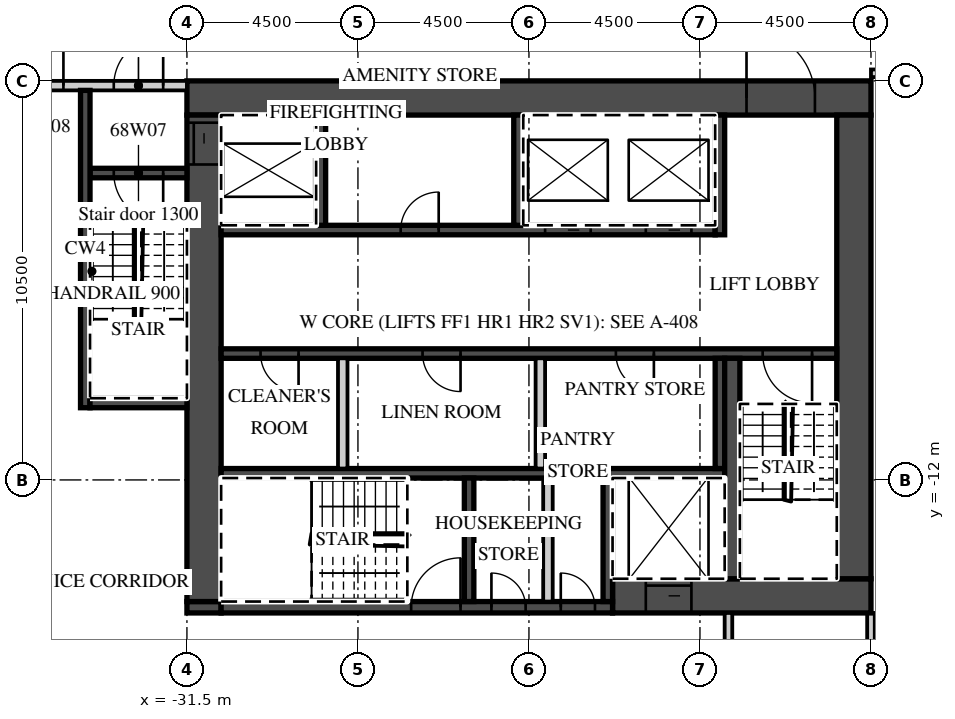
"""IFC4 building model, lengths in metres.
Left out: names, types, materials, properties, quantities, classifications, styles, units other than length and angle.
Written with IfcOpenShell. Run it as: python <this file> out.ifc"""

import sys

from ifc_helpers import new_model, si_unit, direction, frame, frame_2d, origin, place, context, subcontext, project, spatial, rectangle, extrude, element, fill, save


model = new_model("IFC4")
c1 = context("Model", 3, precision=1e-05, world=origin(), true_north=direction((0.0, 1.0)))
c2 = subcontext(c1, "Body", "Model", "MODEL_VIEW")
j1 = project(units=[si_unit("LENGTHUNIT", "METRE"), si_unit("PLANEANGLEUNIT", "RADIAN")], contexts=[c1])
p1 = place(None, origin())
s1 = spatial("IfcSite", under=j1, at=p1, CompositionType="ELEMENT")
p2 = place(p1, origin())
s2 = spatial("IfcBuilding", under=s1, at=p2, CompositionType="ELEMENT")
p3 = place(p2, frame((0.0, 0.0, 275.1)))
s3 = spatial("IfcBuildingStorey", under=s2, at=p3, CompositionType="ELEMENT", Elevation=275.1)
p4 = place(p3, frame((-13.5, -21.396, 0.0), z_axis=(0.0, 0.0, 1.0), x_axis=(0.0, 1.0, 0.0)))
e1 = element("IfcWall", 1, at=p4, inside=s3, PredefinedType="PARTITIONING", context=c2, shape_type="SweptSolid", body=[
    extrude(rectangle(XDim=5.896, YDim=0.2, at=frame_2d((2.948, 0.0))), origin(), (0.0, 0.0, 1.0), 3.02),
])
p5 = place(p3, frame((-13.5, -1.3, 0.0), z_axis=(0.0, 0.0, 1.0), x_axis=(1.0, 0.0, 0.0)))
e2 = element("IfcWall", 2, at=p5, inside=s3, PredefinedType="PARTITIONING", context=c2, shape_type="SweptSolid", body=[
    extrude(rectangle(XDim=50.293, YDim=0.2, at=frame_2d((25.146, 0.0))), origin(), (0.0, 0.0, 1.0), 3.02),
])
p6 = place(p5, frame((0.575, 0.0, 0.0)))
e3 = element("IfcOpeningElement", 3, at=p6, cuts=e2, PredefinedType="OPENING", context=c2, shape_type="SweptSolid", body=[
    extrude(rectangle(XDim=1.0, YDim=2.1, at=frame_2d((0.5, 1.05))), frame((0.0, 0.11, 0.0), z_axis=(0.0, -1.0, 0.0), x_axis=(1.0, 0.0, 0.0)), (0.0, 0.0, 1.0), 0.22),
])
p7 = place(p5, frame((6.938, 0.0, 0.0)))
e4 = element("IfcOpeningElement", 4, at=p7, cuts=e2, PredefinedType="OPENING", context=c2, shape_type="SweptSolid", body=[
    extrude(rectangle(XDim=1.2, YDim=2.1, at=frame_2d((0.6, 1.05))), frame((0.0, 0.11, 0.0), z_axis=(0.0, -1.0, 0.0), x_axis=(1.0, 0.0, 0.0)), (0.0, 0.0, 1.0), 0.22),
])
p8 = place(p5, frame((18.862, 0.0, 0.0)))
e5 = element("IfcOpeningElement", 5, at=p8, cuts=e2, PredefinedType="OPENING", context=c2, shape_type="SweptSolid", body=[
    extrude(rectangle(XDim=1.2, YDim=2.1, at=frame_2d((0.6, 1.05))), frame((0.0, 0.11, 0.0), z_axis=(0.0, -1.0, 0.0), x_axis=(1.0, 0.0, 0.0)), (0.0, 0.0, 1.0), 0.22),
])
p9 = place(p5, frame((24.938, 0.0, 0.0)))
e6 = element("IfcOpeningElement", 6, at=p9, cuts=e2, PredefinedType="OPENING", context=c2, shape_type="SweptSolid", body=[
    extrude(rectangle(XDim=1.2, YDim=2.1, at=frame_2d((0.6, 1.05))), frame((0.0, 0.11, 0.0), z_axis=(0.0, -1.0, 0.0), x_axis=(1.0, 0.0, 0.0)), (0.0, 0.0, 1.0), 0.22),
])
p10 = place(p5, frame((36.862, 0.0, 0.0)))
e7 = element("IfcOpeningElement", 7, at=p10, cuts=e2, PredefinedType="OPENING", context=c2, shape_type="SweptSolid", body=[
    extrude(rectangle(XDim=1.2, YDim=2.1, at=frame_2d((0.6, 1.05))), frame((0.0, 0.11, 0.0), z_axis=(0.0, -1.0, 0.0), x_axis=(1.0, 0.0, 0.0)), (0.0, 0.0, 1.0), 0.22),
])
p11 = place(p5, frame((43.45, 0.0, 0.0)))
e8 = element("IfcOpeningElement", 8, at=p11, cuts=e2, PredefinedType="OPENING", context=c2, shape_type="SweptSolid", body=[
    extrude(rectangle(XDim=1.0, YDim=2.1, at=frame_2d((0.5, 1.05))), frame((0.0, 0.11, 0.0), z_axis=(0.0, -1.0, 0.0), x_axis=(1.0, 0.0, 0.0)), (0.0, 0.0, 1.0), 0.22),
])
p12 = place(p5, frame((45.55, 0.0, 0.0)))
e9 = element("IfcOpeningElement", 9, at=p12, cuts=e2, PredefinedType="OPENING", context=c2, shape_type="SweptSolid", body=[
    extrude(rectangle(XDim=1.0, YDim=2.1, at=frame_2d((0.5, 1.05))), frame((0.0, 0.11, 0.0), z_axis=(0.0, -1.0, 0.0), x_axis=(1.0, 0.0, 0.0)), (0.0, 0.0, 1.0), 0.22),
])
p13 = place(p3, frame((-31.5, -1.95, 0.0), z_axis=(0.0, 0.0, 1.0), x_axis=(1.0, 0.0, 0.0)))
e10 = element("IfcWall", 10, at=p13, inside=s3, PredefinedType="SHEAR", context=c2, shape_type="SweptSolid", body=[
    extrude(rectangle(XDim=18.0, YDim=0.9, at=frame_2d((9.0, 0.0))), origin(), (0.0, 0.0, 1.0), 3.02),
])
p14 = place(p13, frame((14.725, 0.0, 0.0)))
e11 = element("IfcOpeningElement", 11, at=p14, cuts=e10, PredefinedType="OPENING", context=c2, shape_type="SweptSolid", body=[
    extrude(rectangle(XDim=1.8, YDim=2.1, at=frame_2d((0.9, 1.05))), frame((0.0, 0.46, 0.0), z_axis=(0.0, -1.0, 0.0), x_axis=(1.0, 0.0, 0.0)), (0.0, 0.0, 1.0), 0.92),
])
p15 = place(p3, frame((-20.3, -15.05, 0.0), z_axis=(0.0, 0.0, 1.0), x_axis=(1.0, 0.0, 0.0)))
e12 = element("IfcWall", 12, at=p15, inside=s3, PredefinedType="SHEAR", context=c2, shape_type="SweptSolid", body=[
    extrude(rectangle(XDim=6.8, YDim=0.9, at=frame_2d((3.4, 0.0))), origin(), (0.0, 0.0, 1.0), 3.02),
])
p16 = place(p15, frame((0.875, 0.0, 0.0)))
e13 = element("IfcOpeningElement", 13, at=p16, cuts=e12, PredefinedType="OPENING", context=c2, shape_type="SweptSolid", body=[
    extrude(rectangle(XDim=1.2, YDim=2.1, at=frame_2d((0.6, 1.05))), frame((0.0, 0.46, 0.0), z_axis=(0.0, -1.0, 0.0), x_axis=(1.0, 0.0, 0.0)), (0.0, 0.0, 1.0), 0.92),
])
p17 = place(p3, frame((-31.5, -15.35, 0.0), z_axis=(0.0, 0.0, 1.0), x_axis=(1.0, 0.0, 0.0)))
e14 = element("IfcWall", 14, at=p17, inside=s3, PredefinedType="SHEAR", context=c2, shape_type="SweptSolid", body=[
    extrude(rectangle(XDim=0.9, YDim=0.3, at=frame_2d((0.45, 0.0))), origin(), (0.0, 0.0, 1.0), 3.02),
])
p18 = place(p3, frame((-30.6, -15.35, 0.0), z_axis=(0.0, 0.0, 1.0), x_axis=(1.0, 0.0, 0.0)))
e15 = element("IfcWall", 15, at=p18, inside=s3, PredefinedType="SHEAR", context=c2, shape_type="SweptSolid", body=[
    extrude(rectangle(XDim=10.3, YDim=0.3, at=frame_2d((5.15, 0.0))), origin(), (0.0, 0.0, 1.0), 3.02),
])
p19 = place(p18, frame((5.0, 0.0, 0.0)))
e16 = element("IfcOpeningElement", 16, at=p19, cuts=e15, PredefinedType="OPENING", context=c2, shape_type="SweptSolid", body=[
    extrude(rectangle(XDim=1.3, YDim=2.1, at=frame_2d((0.65, 1.05))), frame((0.0, 0.16, 0.0), z_axis=(0.0, -1.0, 0.0), x_axis=(1.0, 0.0, 0.0)), (0.0, 0.0, 1.0), 0.32),
])
p20 = place(p18, frame((7.113, 0.0, 0.0)))
e17 = element("IfcOpeningElement", 17, at=p20, cuts=e15, PredefinedType="OPENING", context=c2, shape_type="SweptSolid", body=[
    extrude(rectangle(XDim=0.9, YDim=2.1, at=frame_2d((0.45, 1.05))), frame((0.0, 0.16, 0.0), z_axis=(0.0, -1.0, 0.0), x_axis=(1.0, 0.0, 0.0)), (0.0, 0.0, 1.0), 0.32),
])
p21 = place(p18, frame((8.938, 0.0, 0.0)))
e18 = element("IfcOpeningElement", 18, at=p21, cuts=e15, PredefinedType="OPENING", context=c2, shape_type="SweptSolid", body=[
    extrude(rectangle(XDim=0.9, YDim=2.1, at=frame_2d((0.45, 1.05))), frame((0.0, 0.16, 0.0), z_axis=(0.0, -1.0, 0.0), x_axis=(1.0, 0.0, 0.0)), (0.0, 0.0, 1.0), 0.32),
])
p22 = place(p3, frame((-31.05, -15.2, 0.0), z_axis=(0.0, 0.0, 1.0), x_axis=(0.0, 1.0, 0.0)))
e19 = element("IfcWall", 19, at=p22, inside=s3, PredefinedType="SHEAR", context=c2, shape_type="SweptSolid", body=[
    extrude(rectangle(XDim=12.8, YDim=0.9, at=frame_2d((6.4, 0.0))), origin(), (0.0, 0.0, 1.0), 3.02),
])
p23 = place(p22, frame((11.5, 0.0, 0.0)))
e20 = element("IfcOpeningElement", 20, at=p23, cuts=e19, PredefinedType="OPENING", context=c2, shape_type="SweptSolid", body=[
    extrude(rectangle(XDim=1.1, YDim=2.1, at=frame_2d((0.55, 1.05))), frame((0.0, 0.46, 0.0), z_axis=(0.0, -1.0, 0.0), x_axis=(1.0, 0.0, 0.0)), (0.0, 0.0, 1.0), 0.92),
])
p24 = place(p3, frame((-13.95, -14.6, 0.0), z_axis=(0.0, 0.0, 1.0), x_axis=(0.0, 1.0, 0.0)))
e21 = element("IfcWall", 21, at=p24, inside=s3, PredefinedType="SHEAR", context=c2, shape_type="SweptSolid", body=[
    extrude(rectangle(XDim=12.2, YDim=0.9, at=frame_2d((6.1, 0.0))), origin(), (0.0, 0.0, 1.0), 3.02),
])
p25 = place(p3, frame((-30.6, -5.425, 0.0), z_axis=(0.0, 0.0, 1.0), x_axis=(1.0, 0.0, 0.0)))
e22 = element("IfcWall", 22, at=p25, inside=s3, PredefinedType="SHEAR", context=c2, shape_type="SweptSolid", body=[
    extrude(rectangle(XDim=13.0, YDim=0.25, at=frame_2d((6.5, 0.0))), origin(), (0.0, 0.0, 1.0), 3.02),
])
p26 = place(p25, frame((8.525, 0.0, 0.0)))
e23 = element("IfcOpeningElement", 23, at=p26, cuts=e22, PredefinedType="OPENING", context=c2, shape_type="SweptSolid", body=[
    extrude(rectangle(XDim=1.2, YDim=2.1, at=frame_2d((0.6, 1.05))), frame((0.0, 0.135, 0.0), z_axis=(0.0, -1.0, 0.0), x_axis=(1.0, 0.0, 0.0)), (0.0, 0.0, 1.0), 0.27),
])
p27 = place(p25, frame((11.175, 0.0, 0.0)))
e24 = element("IfcOpeningElement", 24, at=p27, cuts=e22, PredefinedType="OPENING", context=c2, shape_type="SweptSolid", body=[
    extrude(rectangle(XDim=1.2, YDim=2.1, at=frame_2d((0.6, 1.05))), frame((0.0, 0.135, 0.0), z_axis=(0.0, -1.0, 0.0), x_axis=(1.0, 0.0, 0.0)), (0.0, 0.0, 1.0), 0.27),
])
p28 = place(p25, frame((4.725, 0.0, 0.0)))
e25 = element("IfcOpeningElement", 25, at=p28, cuts=e22, PredefinedType="OPENING", context=c2, shape_type="SweptSolid", body=[
    extrude(rectangle(XDim=1.0, YDim=2.1, at=frame_2d((0.5, 1.05))), frame((0.0, 0.135, 0.0), z_axis=(0.0, -1.0, 0.0), x_axis=(1.0, 0.0, 0.0)), (0.0, 0.0, 1.0), 0.27),
])
p29 = place(p3, frame((-17.475, -5.55, 0.0), z_axis=(0.0, 0.0, 1.0), x_axis=(0.0, 1.0, 0.0)))
e26 = element("IfcWall", 26, at=p29, inside=s3, PredefinedType="SHEAR", context=c2, shape_type="SweptSolid", body=[
    extrude(rectangle(XDim=3.15, YDim=0.25, at=frame_2d((1.575, 0.0))), origin(), (0.0, 0.0, 1.0), 3.02),
])
for number, where, z_axis, x_axis in (
    (27, (-27.975, -5.3, 0.0), (0.0, 0.0, 1.0), (0.0, 1.0, 0.0)),
    (28, (-22.775, -5.3, 0.0), (0.0, 0.0, 1.0), (0.0, 1.0, 0.0)),
):
    element("IfcWall", number, at=place(p3, frame(where, z_axis=z_axis, x_axis=x_axis)), inside=s3, PredefinedType="SHEAR", context=c2, shape_type="SweptSolid", body=[
        extrude(rectangle(XDim=2.9, YDim=0.25, at=frame_2d((1.45, 0.0))), origin(), (0.0, 0.0, 1.0), 3.02),
    ])
p30 = place(p3, frame((-30.6, -8.675, 0.0), z_axis=(0.0, 0.0, 1.0), x_axis=(1.0, 0.0, 0.0)))
e29 = element("IfcWall", 29, at=p30, inside=s3, PredefinedType="SHEAR", context=c2, shape_type="SweptSolid", body=[
    extrude(rectangle(XDim=16.2, YDim=0.25, at=frame_2d((8.1, 0.0))), origin(), (0.0, 0.0, 1.0), 3.02),
])
p31 = place(p30, frame((14.25, 0.0, 0.0)))
e30 = element("IfcOpeningElement", 30, at=p31, cuts=e29, PredefinedType="OPENING", context=c2, shape_type="SweptSolid", body=[
    extrude(rectangle(XDim=1.3, YDim=2.1, at=frame_2d((0.65, 1.05))), frame((0.0, 0.135, 0.0), z_axis=(0.0, -1.0, 0.0), x_axis=(1.0, 0.0, 0.0)), (0.0, 0.0, 1.0), 0.27),
])
p32 = place(p30, frame((1.038, 0.0, 0.0)))
e31 = element("IfcOpeningElement", 31, at=p32, cuts=e29, PredefinedType="OPENING", context=c2, shape_type="SweptSolid", body=[
    extrude(rectangle(XDim=1.0, YDim=2.1, at=frame_2d((0.5, 1.05))), frame((0.0, 0.135, 0.0), z_axis=(0.0, -1.0, 0.0), x_axis=(1.0, 0.0, 0.0)), (0.0, 0.0, 1.0), 0.27),
])
p33 = place(p30, frame((5.3, 0.0, 0.0)))
e32 = element("IfcOpeningElement", 32, at=p33, cuts=e29, PredefinedType="OPENING", context=c2, shape_type="SweptSolid", body=[
    extrude(rectangle(XDim=1.0, YDim=2.1, at=frame_2d((0.5, 1.05))), frame((0.0, 0.135, 0.0), z_axis=(0.0, -1.0, 0.0), x_axis=(1.0, 0.0, 0.0)), (0.0, 0.0, 1.0), 0.27),
])
p34 = place(p30, frame((10.387, 0.0, 0.0)))
e33 = element("IfcOpeningElement", 33, at=p34, cuts=e29, PredefinedType="OPENING", context=c2, shape_type="SweptSolid", body=[
    extrude(rectangle(XDim=1.0, YDim=2.1, at=frame_2d((0.5, 1.05))), frame((0.0, 0.135, 0.0), z_axis=(0.0, -1.0, 0.0), x_axis=(1.0, 0.0, 0.0)), (0.0, 0.0, 1.0), 0.27),
])
p35 = place(p3, frame((-30.6, -11.825, 0.0), z_axis=(0.0, 0.0, 1.0), x_axis=(1.0, 0.0, 0.0)))
e34 = element("IfcWall", 34, at=p35, inside=s3, PredefinedType="SHEAR", context=c2, shape_type="SweptSolid", body=[
    extrude(rectangle(XDim=13.25, YDim=0.25, at=frame_2d((6.625, 0.0))), origin(), (0.0, 0.0, 1.0), 3.02),
])
p36 = place(p3, frame((-17.475, -11.7, 0.0), z_axis=(0.0, 0.0, 1.0), x_axis=(0.0, 1.0, 0.0)))
e35 = element("IfcWall", 35, at=p36, inside=s3, PredefinedType="SHEAR", context=c2, shape_type="SweptSolid", body=[
    extrude(rectangle(XDim=2.9, YDim=0.25, at=frame_2d((1.45, 0.0))), origin(), (0.0, 0.0, 1.0), 3.02),
])
for number, where, z_axis, x_axis in (
    (36, (-27.4, -11.7, 0.0), (0.0, 0.0, 1.0), (0.0, 1.0, 0.0)),
    (37, (-22.2, -11.7, 0.0), (0.0, 0.0, 1.0), (0.0, 1.0, 0.0)),
):
    element("IfcWall", number, at=place(p3, frame(where, z_axis=z_axis, x_axis=x_axis)), inside=s3, PredefinedType="PARTITIONING", context=c2, shape_type="SweptSolid", body=[
        extrude(rectangle(XDim=2.9, YDim=0.25, at=frame_2d((1.45, 0.0))), origin(), (0.0, 0.0, 1.0), 3.02),
    ])
p37 = place(p3, frame((-17.15, -14.6, 0.0), z_axis=(0.0, 0.0, 1.0), x_axis=(0.0, 1.0, 0.0)))
e38 = element("IfcWall", 38, at=p37, inside=s3, PredefinedType="SHEAR", context=c2, shape_type="SweptSolid", body=[
    extrude(rectangle(XDim=5.8, YDim=0.4, at=frame_2d((2.9, 0.0))), origin(), (0.0, 0.0, 1.0), 3.02),
])
for number, where, z_axis, x_axis in (
    (39, (-20.425, -15.2, 0.0), (0.0, 0.0, 1.0), (0.0, 1.0, 0.0)),
    (40, (-24.075, -15.2, 0.0), (0.0, 0.0, 1.0), (0.0, 1.0, 0.0)),
):
    element("IfcWall", number, at=place(p3, frame(where, z_axis=z_axis, x_axis=x_axis)), inside=s3, PredefinedType="SHEAR", context=c2, shape_type="SweptSolid", body=[
        extrude(rectangle(XDim=3.25, YDim=0.25, at=frame_2d((1.625, 0.0))), origin(), (0.0, 0.0, 1.0), 3.02),
    ])
p38 = place(p3, frame((-22.0, -15.2, 0.0), z_axis=(0.0, 0.0, 1.0), x_axis=(0.0, 1.0, 0.0)))
e41 = element("IfcWall", 41, at=p38, inside=s3, PredefinedType="PARTITIONING", context=c2, shape_type="SweptSolid", body=[
    extrude(rectangle(XDim=3.25, YDim=0.25, at=frame_2d((1.625, 0.0))), origin(), (0.0, 0.0, 1.0), 3.02),
])
p39 = place(p3, frame((-39.627, -1.625, 0.0), z_axis=(0.0, 0.0, 1.0), x_axis=(1.0, 0.0, 0.0)))
e42 = element("IfcWall", 42, at=p39, inside=s3, PredefinedType="PARTITIONING", context=c2, shape_type="SweptSolid", body=[
    extrude(rectangle(XDim=8.127, YDim=0.25, at=frame_2d((4.063, 0.0))), origin(), (0.0, 0.0, 1.0), 3.02),
])
p40 = place(p39, frame((6.202, 0.0, 0.0)))
e43 = element("IfcOpeningElement", 43, at=p40, cuts=e42, PredefinedType="OPENING", context=c2, shape_type="SweptSolid", body=[
    extrude(rectangle(XDim=1.3, YDim=2.1, at=frame_2d((0.65, 1.05))), frame((0.0, 0.135, 0.0), z_axis=(0.0, -1.0, 0.0), x_axis=(1.0, 0.0, 0.0)), (0.0, 0.0, 1.0), 0.27),
])
p41 = place(p39, frame((3.777, 0.0, 0.0)))
e44 = element("IfcOpeningElement", 44, at=p41, cuts=e42, PredefinedType="OPENING", context=c2, shape_type="SweptSolid", body=[
    extrude(rectangle(XDim=1.1, YDim=2.1, at=frame_2d((0.55, 1.05))), frame((0.0, 0.135, 0.0), z_axis=(0.0, -1.0, 0.0), x_axis=(1.0, 0.0, 0.0)), (0.0, 0.0, 1.0), 0.27),
])
p42 = place(p3, frame((-34.05, -3.925, 0.0), z_axis=(0.0, 0.0, 1.0), x_axis=(1.0, 0.0, 0.0)))
e45 = element("IfcWall", 45, at=p42, inside=s3, PredefinedType="SHEAR", context=c2, shape_type="SweptSolid", body=[
    extrude(rectangle(XDim=2.55, YDim=0.25, at=frame_2d((1.275, 0.0))), origin(), (0.0, 0.0, 1.0), 3.02),
])
p43 = place(p42, frame((0.625, 0.0, 0.0)))
e46 = element("IfcOpeningElement", 46, at=p43, cuts=e45, PredefinedType="OPENING", context=c2, shape_type="SweptSolid", body=[
    extrude(rectangle(XDim=1.3, YDim=2.1, at=frame_2d((0.65, 1.05))), frame((0.0, 0.135, 0.0), z_axis=(0.0, -1.0, 0.0), x_axis=(1.0, 0.0, 0.0)), (0.0, 0.0, 1.0), 0.27),
])
p44 = place(p3, frame((-34.175, -10.1, 0.0), z_axis=(0.0, 0.0, 1.0), x_axis=(0.0, 1.0, 0.0)))
e47 = element("IfcWall", 47, at=p44, inside=s3, PredefinedType="SHEAR", context=c2, shape_type="SweptSolid", body=[
    extrude(rectangle(XDim=8.35, YDim=0.25, at=frame_2d((4.175, 0.0))), origin(), (0.0, 0.0, 1.0), 3.02),
])
p45 = place(p3, frame((-34.05, -9.975, 0.0), z_axis=(0.0, 0.0, 1.0), x_axis=(1.0, 0.0, 0.0)))
e48 = element("IfcWall", 48, at=p45, inside=s3, PredefinedType="SHEAR", context=c2, shape_type="SweptSolid", body=[
    extrude(rectangle(XDim=2.55, YDim=0.25, at=frame_2d((1.275, 0.0))), origin(), (0.0, 0.0, 1.0), 3.02),
])
p46 = place(p3, frame((-17.25, -17.7, 0.0), z_axis=(0.0, 0.0, 1.0), x_axis=(0.0, 1.0, 0.0)))
e49 = element("IfcWall", 49, at=p46, inside=s3, PredefinedType="PARTITIONING", context=c2, shape_type="SweptSolid", body=[
    extrude(rectangle(XDim=2.2, YDim=0.2, at=frame_2d((1.1, 0.0))), origin(), (0.0, 0.0, 1.0), 3.02),
])
p47 = place(p26, origin())
e50 = element("IfcDoor", 50, at=p47, inside=s3, OperationType="SLIDING_TO_LEFT", PredefinedType="DOOR", context=c2, shape_type="SweptSolid", body=[
    extrude(rectangle(XDim=1.2, YDim=2.1, at=frame_2d((0.6, 1.05))), frame((0.0, 0.025, 0.0), z_axis=(0.0, -1.0, 0.0), x_axis=(1.0, 0.0, 0.0)), (0.0, 0.0, 1.0), 0.05),
])
fill(e23, e50)
p48 = place(p27, origin())
e51 = element("IfcDoor", 51, at=p48, inside=s3, OperationType="SLIDING_TO_RIGHT", PredefinedType="DOOR", context=c2, shape_type="SweptSolid", body=[
    extrude(rectangle(XDim=1.2, YDim=2.1, at=frame_2d((0.6, 1.05))), frame((0.0, 0.025, 0.0), z_axis=(0.0, -1.0, 0.0), x_axis=(1.0, 0.0, 0.0)), (0.0, 0.0, 1.0), 0.05),
])
fill(e24, e51)
p49 = place(p16, origin())
e52 = element("IfcDoor", 52, at=p49, inside=s3, OperationType="SLIDING_TO_LEFT", PredefinedType="DOOR", context=c2, shape_type="SweptSolid", body=[
    extrude(rectangle(XDim=1.2, YDim=2.1, at=frame_2d((0.6, 1.05))), frame((0.0, 0.025, 0.0), z_axis=(0.0, -1.0, 0.0), x_axis=(1.0, 0.0, 0.0)), (0.0, 0.0, 1.0), 0.05),
])
fill(e13, e52)
p50 = place(p23, origin())
e53 = element("IfcDoor", 53, at=p50, inside=s3, OperationType="SLIDING_TO_RIGHT", PredefinedType="DOOR", context=c2, shape_type="SweptSolid", body=[
    extrude(rectangle(XDim=1.1, YDim=2.1, at=frame_2d((0.55, 1.05))), frame((0.0, 0.025, 0.0), z_axis=(0.0, -1.0, 0.0), x_axis=(1.0, 0.0, 0.0)), (0.0, 0.0, 1.0), 0.05),
])
fill(e20, e53)
p51 = place(p14, origin())
e54 = element("IfcDoor", 54, at=p51, inside=s3, OperationType="DOUBLE_DOOR_DOUBLE_SWING", PredefinedType="DOOR", context=c2, shape_type="SweptSolid", body=[
    extrude(rectangle(XDim=1.8, YDim=2.1, at=frame_2d((0.9, 1.05))), frame((0.0, 0.025, 0.0), z_axis=(0.0, -1.0, 0.0), x_axis=(1.0, 0.0, 0.0)), (0.0, 0.0, 1.0), 0.05),
])
fill(e11, e54)
p52 = place(p40, origin())
e55 = element("IfcDoor", 55, at=p52, inside=s3, OperationType="SINGLE_SWING_RIGHT", PredefinedType="DOOR", context=c2, shape_type="SweptSolid", body=[
    extrude(rectangle(XDim=1.3, YDim=2.1, at=frame_2d((0.65, 1.05))), frame((0.0, 0.025, 0.0), z_axis=(0.0, -1.0, 0.0), x_axis=(1.0, 0.0, 0.0)), (0.0, 0.0, 1.0), 0.05),
])
fill(e43, e55)
p53 = place(p43, origin())
e56 = element("IfcDoor", 56, at=p53, inside=s3, OperationType="SINGLE_SWING_RIGHT", PredefinedType="DOOR", context=c2, shape_type="SweptSolid", body=[
    extrude(rectangle(XDim=1.3, YDim=2.1, at=frame_2d((0.65, 1.05))), frame((0.0, 0.025, 0.0), z_axis=(0.0, -1.0, 0.0), x_axis=(1.0, 0.0, 0.0)), (0.0, 0.0, 1.0), 0.05),
])
fill(e46, e56)
p54 = place(p41, origin())
e57 = element("IfcDoor", 57, at=p54, inside=s3, OperationType="SINGLE_SWING_RIGHT", PredefinedType="DOOR", context=c2, shape_type="SweptSolid", body=[
    extrude(rectangle(XDim=1.1, YDim=2.1, at=frame_2d((0.55, 1.05))), frame((0.0, 0.025, 0.0), z_axis=(0.0, -1.0, 0.0), x_axis=(1.0, 0.0, 0.0)), (0.0, 0.0, 1.0), 0.05),
])
fill(e44, e57)
p55 = place(p31, origin())
e58 = element("IfcDoor", 58, at=p55, inside=s3, OperationType="SINGLE_SWING_RIGHT", PredefinedType="DOOR", context=c2, shape_type="SweptSolid", body=[
    extrude(rectangle(XDim=1.3, YDim=2.1, at=frame_2d((0.65, 1.05))), frame((0.0, 0.025, 0.0), z_axis=(0.0, -1.0, 0.0), x_axis=(1.0, 0.0, 0.0)), (0.0, 0.0, 1.0), 0.05),
])
fill(e30, e58)
p56 = place(p19, origin())
e59 = element("IfcDoor", 59, at=p56, inside=s3, OperationType="SINGLE_SWING_RIGHT", PredefinedType="DOOR", context=c2, shape_type="SweptSolid", body=[
    extrude(rectangle(XDim=1.3, YDim=2.1, at=frame_2d((0.65, 1.05))), frame((0.0, 0.025, 0.0), z_axis=(0.0, -1.0, 0.0), x_axis=(1.0, 0.0, 0.0)), (0.0, 0.0, 1.0), 0.05),
])
fill(e16, e59)
p57 = place(p20, origin())
e60 = element("IfcDoor", 60, at=p57, inside=s3, OperationType="SINGLE_SWING_LEFT", PredefinedType="DOOR", context=c2, shape_type="SweptSolid", body=[
    extrude(rectangle(XDim=0.9, YDim=2.1, at=frame_2d((0.45, 1.05))), frame((0.0, 0.025, 0.0), z_axis=(0.0, -1.0, 0.0), x_axis=(1.0, 0.0, 0.0)), (0.0, 0.0, 1.0), 0.05),
])
fill(e17, e60)
p58 = place(p21, origin())
e61 = element("IfcDoor", 61, at=p58, inside=s3, OperationType="SINGLE_SWING_LEFT", PredefinedType="DOOR", context=c2, shape_type="SweptSolid", body=[
    extrude(rectangle(XDim=0.9, YDim=2.1, at=frame_2d((0.45, 1.05))), frame((0.0, 0.025, 0.0), z_axis=(0.0, -1.0, 0.0), x_axis=(1.0, 0.0, 0.0)), (0.0, 0.0, 1.0), 0.05),
])
fill(e18, e61)
p59 = place(p32, origin())
e62 = element("IfcDoor", 62, at=p59, inside=s3, OperationType="SINGLE_SWING_RIGHT", PredefinedType="DOOR", context=c2, shape_type="SweptSolid", body=[
    extrude(rectangle(XDim=1.0, YDim=2.1, at=frame_2d((0.5, 1.05))), frame((0.0, 0.025, 0.0), z_axis=(0.0, -1.0, 0.0), x_axis=(1.0, 0.0, 0.0)), (0.0, 0.0, 1.0), 0.05),
])
fill(e31, e62)
p60 = place(p33, origin())
e63 = element("IfcDoor", 63, at=p60, inside=s3, OperationType="SINGLE_SWING_RIGHT", PredefinedType="DOOR", context=c2, shape_type="SweptSolid", body=[
    extrude(rectangle(XDim=1.0, YDim=2.1, at=frame_2d((0.5, 1.05))), frame((0.0, 0.025, 0.0), z_axis=(0.0, -1.0, 0.0), x_axis=(1.0, 0.0, 0.0)), (0.0, 0.0, 1.0), 0.05),
])
fill(e32, e63)
p61 = place(p34, origin())
e64 = element("IfcDoor", 64, at=p61, inside=s3, OperationType="SINGLE_SWING_RIGHT", PredefinedType="DOOR", context=c2, shape_type="SweptSolid", body=[
    extrude(rectangle(XDim=1.0, YDim=2.1, at=frame_2d((0.5, 1.05))), frame((0.0, 0.025, 0.0), z_axis=(0.0, -1.0, 0.0), x_axis=(1.0, 0.0, 0.0)), (0.0, 0.0, 1.0), 0.05),
])
fill(e33, e64)
p62 = place(p28, origin())
e65 = element("IfcDoor", 65, at=p62, inside=s3, OperationType="SINGLE_SWING_RIGHT", PredefinedType="DOOR", context=c2, shape_type="SweptSolid", body=[
    extrude(rectangle(XDim=1.0, YDim=2.1, at=frame_2d((0.5, 1.05))), frame((0.0, 0.025, 0.0), z_axis=(0.0, -1.0, 0.0), x_axis=(1.0, 0.0, 0.0)), (0.0, 0.0, 1.0), 0.05),
])
fill(e25, e65)
save(model, sys.argv[1])
